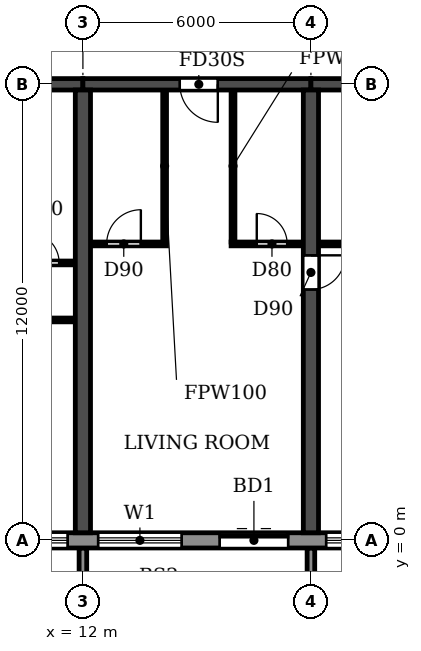
"""IFC4 building model, lengths in metres.
Left out: names, types, materials, properties, quantities, classifications, styles, units other than length and angle.
Written with IfcOpenShell. Run it as: python <this file> out.ifc"""

import sys

from ifc_helpers import new_model, si_unit, direction, frame, frame_2d, origin, place, context, subcontext, project, spatial, polyline, rectangle, outline, extrude, source, transform, mapped, element, fill, save


model = new_model("IFC4")
c1 = context("Model", 3, precision=1e-05, world=origin(), true_north=direction((0.0, 1.0)))
c2 = subcontext(c1, "Body", "Model", "MODEL_VIEW")
j1 = project(units=[si_unit("LENGTHUNIT", "METRE"), si_unit("PLANEANGLEUNIT", "RADIAN")], contexts=[c1])
p1 = place(None, origin())
s1 = spatial("IfcSite", under=j1, at=p1, CompositionType="ELEMENT")
p2 = place(p1, origin())
s2 = spatial("IfcBuilding", under=s1, at=p2, CompositionType="ELEMENT")
p3 = place(p2, frame((0.0, 0.0, 43.2)))
s3 = spatial("IfcBuildingStorey", under=s2, at=p3, CompositionType="ELEMENT", Elevation=43.2)
p4 = place(p3, frame((12.0, 0.2, 0.0), z_axis=(0.0, 0.0, 1.0), x_axis=(0.0, 1.0, 0.0)))
e1 = element("IfcWall", 1, at=p4, inside=s3, PredefinedType="SHEAR", context=c2, shape_type="SweptSolid", body=[
    extrude(rectangle(XDim=11.65, YDim=0.4, at=frame_2d((5.825, 0.0))), origin(), (0.0, 0.0, 1.0), 3.05),
])
p5 = place(p3, frame((18.0, 0.2, 0.0), z_axis=(0.0, 0.0, 1.0), x_axis=(0.0, 1.0, 0.0)))
e2 = element("IfcWall", 2, at=p5, inside=s3, PredefinedType="SHEAR", context=c2, shape_type="SweptSolid", body=[
    extrude(rectangle(XDim=11.65, YDim=0.4, at=frame_2d((5.825, 0.0))), origin(), (0.0, 0.0, 1.0), 3.05),
])
p6 = place(p5, frame((6.4, 0.0, 0.0)))
e3 = element("IfcOpeningElement", 3, at=p6, cuts=e2, PredefinedType="OPENING", context=c2, shape_type="SweptSolid", body=[
    extrude(rectangle(XDim=0.9, YDim=2.1, at=frame_2d((0.45, 1.05))), frame((0.0, 0.21, 0.0), z_axis=(0.0, -1.0, 0.0), x_axis=(1.0, 0.0, 0.0)), (0.0, 0.0, 1.0), 0.42),
])
p7 = place(p3, frame((6.0, 12.0, 0.0), z_axis=(0.0, 0.0, 1.0), x_axis=(1.0, 0.0, 0.0)))
e4 = element("IfcWall", 4, at=p7, inside=s3, PredefinedType="SHEAR", context=c2, shape_type="SweptSolid", body=[
    extrude(rectangle(XDim=6.0, YDim=0.3, at=frame_2d((3.0, 0.0))), origin(), (0.0, 0.0, 1.0), 2.45),
])
p8 = place(p7, frame((2.55, 0.0, 0.0)))
e5 = element("IfcOpeningElement", 5, at=p8, cuts=e4, PredefinedType="OPENING", context=c2, shape_type="SweptSolid", body=[
    extrude(rectangle(XDim=1.0, YDim=2.1, at=frame_2d((0.5, 1.05))), frame((0.0, 0.16, 0.0), z_axis=(0.0, -1.0, 0.0), x_axis=(1.0, 0.0, 0.0)), (0.0, 0.0, 1.0), 0.32),
])
p9 = place(p3, frame((12.0, 12.0, 0.0), z_axis=(0.0, 0.0, 1.0), x_axis=(1.0, 0.0, 0.0)))
e6 = element("IfcWall", 6, at=p9, inside=s3, PredefinedType="SHEAR", context=c2, shape_type="SweptSolid", body=[
    extrude(rectangle(XDim=6.0, YDim=0.3, at=frame_2d((3.0, 0.0))), origin(), (0.0, 0.0, 1.0), 2.45),
])
p10 = place(p9, frame((2.55, 0.0, 0.0)))
e7 = element("IfcOpeningElement", 7, at=p10, cuts=e6, PredefinedType="OPENING", context=c2, shape_type="SweptSolid", body=[
    extrude(rectangle(XDim=1.0, YDim=2.1, at=frame_2d((0.5, 1.05))), frame((0.0, 0.16, 0.0), z_axis=(0.0, -1.0, 0.0), x_axis=(1.0, 0.0, 0.0)), (0.0, 0.0, 1.0), 0.32),
])
p11 = place(p3, frame((18.0, 12.0, 0.0), z_axis=(0.0, 0.0, 1.0), x_axis=(1.0, 0.0, 0.0)))
e8 = element("IfcWall", 8, at=p11, inside=s3, PredefinedType="SHEAR", context=c2, shape_type="SweptSolid", body=[
    extrude(rectangle(XDim=6.0, YDim=0.3, at=frame_2d((3.0, 0.0))), origin(), (0.0, 0.0, 1.0), 2.45),
])
p12 = place(p3, frame((4.683, 0.0, 0.0), z_axis=(0.0, 0.0, 1.0), x_axis=(1.0, 0.0, 0.0)))
e9 = element("IfcWall", 9, at=p12, inside=s3, PredefinedType="STANDARD", context=c2, shape_type="SweptSolid", body=[
    extrude(rectangle(XDim=92.634, YDim=0.4, at=frame_2d((46.317, 0.0))), origin(), (0.0, 0.0, 1.0), 3.05),
])
p13 = place(p12, frame((1.717, 0.0, 0.9)))
e10 = element("IfcOpeningElement", 10, at=p13, cuts=e9, PredefinedType="OPENING", context=c2, shape_type="SweptSolid", body=[
    extrude(rectangle(XDim=2.2, YDim=1.5, at=frame_2d((1.1, 0.75))), frame((0.0, 0.21, 0.0), z_axis=(0.0, -1.0, 0.0), x_axis=(1.0, 0.0, 0.0)), (0.0, 0.0, 1.0), 0.42),
])
p14 = place(p12, frame((4.717, 0.0, 0.9)))
e11 = element("IfcOpeningElement", 11, at=p14, cuts=e9, PredefinedType="OPENING", context=c2, shape_type="SweptSolid", body=[
    extrude(rectangle(XDim=2.2, YDim=1.5, at=frame_2d((1.1, 0.75))), frame((0.0, 0.21, 0.0), z_axis=(0.0, -1.0, 0.0), x_axis=(1.0, 0.0, 0.0)), (0.0, 0.0, 1.0), 0.42),
])
p15 = place(p12, frame((7.717, 0.0, 0.9)))
e12 = element("IfcOpeningElement", 12, at=p15, cuts=e9, PredefinedType="OPENING", context=c2, shape_type="SweptSolid", body=[
    extrude(rectangle(XDim=2.2, YDim=1.5, at=frame_2d((1.1, 0.75))), frame((0.0, 0.21, 0.0), z_axis=(0.0, -1.0, 0.0), x_axis=(1.0, 0.0, 0.0)), (0.0, 0.0, 1.0), 0.42),
])
p16 = place(p12, frame((10.917, 0.0, 0.0)))
e13 = element("IfcOpeningElement", 13, at=p16, cuts=e9, PredefinedType="OPENING", context=c2, shape_type="SweptSolid", body=[
    extrude(rectangle(XDim=1.8, YDim=2.4, at=frame_2d((0.9, 1.2))), frame((0.0, 0.21, 0.0), z_axis=(0.0, -1.0, 0.0), x_axis=(1.0, 0.0, 0.0)), (0.0, 0.0, 1.0), 0.42),
])
p17 = place(p12, frame((13.717, 0.0, 0.9)))
e14 = element("IfcOpeningElement", 14, at=p17, cuts=e9, PredefinedType="OPENING", context=c2, shape_type="SweptSolid", body=[
    extrude(rectangle(XDim=2.2, YDim=1.5, at=frame_2d((1.1, 0.75))), frame((0.0, 0.21, 0.0), z_axis=(0.0, -1.0, 0.0), x_axis=(1.0, 0.0, 0.0)), (0.0, 0.0, 1.0), 0.42),
])
p18 = place(p12, frame((16.717, 0.0, 0.9)))
e15 = element("IfcOpeningElement", 15, at=p18, cuts=e9, PredefinedType="OPENING", context=c2, shape_type="SweptSolid", body=[
    extrude(rectangle(XDim=2.2, YDim=1.5, at=frame_2d((1.1, 0.75))), frame((0.0, 0.21, 0.0), z_axis=(0.0, -1.0, 0.0), x_axis=(1.0, 0.0, 0.0)), (0.0, 0.0, 1.0), 0.42),
])
p19 = place(p12, frame((19.917, 0.0, 0.0)))
e16 = element("IfcOpeningElement", 16, at=p19, cuts=e9, PredefinedType="OPENING", context=c2, shape_type="SweptSolid", body=[
    extrude(rectangle(XDim=1.8, YDim=2.4, at=frame_2d((0.9, 1.2))), frame((0.0, 0.21, 0.0), z_axis=(0.0, -1.0, 0.0), x_axis=(1.0, 0.0, 0.0)), (0.0, 0.0, 1.0), 0.42),
])
p20 = place(p12, frame((22.717, 0.0, 0.9)))
e17 = element("IfcOpeningElement", 17, at=p20, cuts=e9, PredefinedType="OPENING", context=c2, shape_type="SweptSolid", body=[
    extrude(rectangle(XDim=2.2, YDim=1.5, at=frame_2d((1.1, 0.75))), frame((0.0, 0.21, 0.0), z_axis=(0.0, -1.0, 0.0), x_axis=(1.0, 0.0, 0.0)), (0.0, 0.0, 1.0), 0.42),
])
p21 = place(p12, frame((25.717, 0.0, 0.9)))
e18 = element("IfcOpeningElement", 18, at=p21, cuts=e9, PredefinedType="OPENING", context=c2, shape_type="SweptSolid", body=[
    extrude(rectangle(XDim=2.2, YDim=1.5, at=frame_2d((1.1, 0.75))), frame((0.0, 0.21, 0.0), z_axis=(0.0, -1.0, 0.0), x_axis=(1.0, 0.0, 0.0)), (0.0, 0.0, 1.0), 0.42),
])
p22 = place(p12, frame((28.717, 0.0, 0.9)))
e19 = element("IfcOpeningElement", 19, at=p22, cuts=e9, PredefinedType="OPENING", context=c2, shape_type="SweptSolid", body=[
    extrude(rectangle(XDim=2.2, YDim=1.5, at=frame_2d((1.1, 0.75))), frame((0.0, 0.21, 0.0), z_axis=(0.0, -1.0, 0.0), x_axis=(1.0, 0.0, 0.0)), (0.0, 0.0, 1.0), 0.42),
])
p23 = place(p12, frame((31.717, 0.0, 0.9)))
e20 = element("IfcOpeningElement", 20, at=p23, cuts=e9, PredefinedType="OPENING", context=c2, shape_type="SweptSolid", body=[
    extrude(rectangle(XDim=2.2, YDim=1.5, at=frame_2d((1.1, 0.75))), frame((0.0, 0.21, 0.0), z_axis=(0.0, -1.0, 0.0), x_axis=(1.0, 0.0, 0.0)), (0.0, 0.0, 1.0), 0.42),
])
p24 = place(p12, frame((34.917, 0.0, 0.0)))
e21 = element("IfcOpeningElement", 21, at=p24, cuts=e9, PredefinedType="OPENING", context=c2, shape_type="SweptSolid", body=[
    extrude(rectangle(XDim=1.8, YDim=2.4, at=frame_2d((0.9, 1.2))), frame((0.0, 0.21, 0.0), z_axis=(0.0, -1.0, 0.0), x_axis=(1.0, 0.0, 0.0)), (0.0, 0.0, 1.0), 0.42),
])
p25 = place(p12, frame((37.717, 0.0, 0.9)))
e22 = element("IfcOpeningElement", 22, at=p25, cuts=e9, PredefinedType="OPENING", context=c2, shape_type="SweptSolid", body=[
    extrude(rectangle(XDim=2.2, YDim=1.5, at=frame_2d((1.1, 0.75))), frame((0.0, 0.21, 0.0), z_axis=(0.0, -1.0, 0.0), x_axis=(1.0, 0.0, 0.0)), (0.0, 0.0, 1.0), 0.42),
])
p26 = place(p12, frame((40.717, 0.0, 0.9)))
e23 = element("IfcOpeningElement", 23, at=p26, cuts=e9, PredefinedType="OPENING", context=c2, shape_type="SweptSolid", body=[
    extrude(rectangle(XDim=2.2, YDim=1.5, at=frame_2d((1.1, 0.75))), frame((0.0, 0.21, 0.0), z_axis=(0.0, -1.0, 0.0), x_axis=(1.0, 0.0, 0.0)), (0.0, 0.0, 1.0), 0.42),
])
p27 = place(p12, frame((43.717, 0.0, 0.9)))
e24 = element("IfcOpeningElement", 24, at=p27, cuts=e9, PredefinedType="OPENING", context=c2, shape_type="SweptSolid", body=[
    extrude(rectangle(XDim=2.2, YDim=1.5, at=frame_2d((1.1, 0.75))), frame((0.0, 0.21, 0.0), z_axis=(0.0, -1.0, 0.0), x_axis=(1.0, 0.0, 0.0)), (0.0, 0.0, 1.0), 0.42),
])
p28 = place(p12, frame((46.917, 0.0, 0.0)))
e25 = element("IfcOpeningElement", 25, at=p28, cuts=e9, PredefinedType="OPENING", context=c2, shape_type="SweptSolid", body=[
    extrude(rectangle(XDim=1.8, YDim=2.4, at=frame_2d((0.9, 1.2))), frame((0.0, 0.21, 0.0), z_axis=(0.0, -1.0, 0.0), x_axis=(1.0, 0.0, 0.0)), (0.0, 0.0, 1.0), 0.42),
])
p29 = place(p12, frame((49.717, 0.0, 0.9)))
e26 = element("IfcOpeningElement", 26, at=p29, cuts=e9, PredefinedType="OPENING", context=c2, shape_type="SweptSolid", body=[
    extrude(rectangle(XDim=2.2, YDim=1.5, at=frame_2d((1.1, 0.75))), frame((0.0, 0.21, 0.0), z_axis=(0.0, -1.0, 0.0), x_axis=(1.0, 0.0, 0.0)), (0.0, 0.0, 1.0), 0.42),
])
p30 = place(p12, frame((52.717, 0.0, 0.9)))
e27 = element("IfcOpeningElement", 27, at=p30, cuts=e9, PredefinedType="OPENING", context=c2, shape_type="SweptSolid", body=[
    extrude(rectangle(XDim=2.2, YDim=1.5, at=frame_2d((1.1, 0.75))), frame((0.0, 0.21, 0.0), z_axis=(0.0, -1.0, 0.0), x_axis=(1.0, 0.0, 0.0)), (0.0, 0.0, 1.0), 0.42),
])
p31 = place(p12, frame((55.717, 0.0, 0.9)))
e28 = element("IfcOpeningElement", 28, at=p31, cuts=e9, PredefinedType="OPENING", context=c2, shape_type="SweptSolid", body=[
    extrude(rectangle(XDim=2.2, YDim=1.5, at=frame_2d((1.1, 0.75))), frame((0.0, 0.21, 0.0), z_axis=(0.0, -1.0, 0.0), x_axis=(1.0, 0.0, 0.0)), (0.0, 0.0, 1.0), 0.42),
])
p32 = place(p12, frame((58.917, 0.0, 0.0)))
e29 = element("IfcOpeningElement", 29, at=p32, cuts=e9, PredefinedType="OPENING", context=c2, shape_type="SweptSolid", body=[
    extrude(rectangle(XDim=1.8, YDim=2.4, at=frame_2d((0.9, 1.2))), frame((0.0, 0.21, 0.0), z_axis=(0.0, -1.0, 0.0), x_axis=(1.0, 0.0, 0.0)), (0.0, 0.0, 1.0), 0.42),
])
p33 = place(p12, frame((61.717, 0.0, 0.9)))
e30 = element("IfcOpeningElement", 30, at=p33, cuts=e9, PredefinedType="OPENING", context=c2, shape_type="SweptSolid", body=[
    extrude(rectangle(XDim=2.2, YDim=1.5, at=frame_2d((1.1, 0.75))), frame((0.0, 0.21, 0.0), z_axis=(0.0, -1.0, 0.0), x_axis=(1.0, 0.0, 0.0)), (0.0, 0.0, 1.0), 0.42),
])
p34 = place(p12, frame((64.717, 0.0, 0.9)))
e31 = element("IfcOpeningElement", 31, at=p34, cuts=e9, PredefinedType="OPENING", context=c2, shape_type="SweptSolid", body=[
    extrude(rectangle(XDim=2.2, YDim=1.5, at=frame_2d((1.1, 0.75))), frame((0.0, 0.21, 0.0), z_axis=(0.0, -1.0, 0.0), x_axis=(1.0, 0.0, 0.0)), (0.0, 0.0, 1.0), 0.42),
])
p35 = place(p12, frame((67.717, 0.0, 0.9)))
e32 = element("IfcOpeningElement", 32, at=p35, cuts=e9, PredefinedType="OPENING", context=c2, shape_type="SweptSolid", body=[
    extrude(rectangle(XDim=2.2, YDim=1.5, at=frame_2d((1.1, 0.75))), frame((0.0, 0.21, 0.0), z_axis=(0.0, -1.0, 0.0), x_axis=(1.0, 0.0, 0.0)), (0.0, 0.0, 1.0), 0.42),
])
p36 = place(p12, frame((70.917, 0.0, 0.0)))
e33 = element("IfcOpeningElement", 33, at=p36, cuts=e9, PredefinedType="OPENING", context=c2, shape_type="SweptSolid", body=[
    extrude(rectangle(XDim=1.8, YDim=2.4, at=frame_2d((0.9, 1.2))), frame((0.0, 0.21, 0.0), z_axis=(0.0, -1.0, 0.0), x_axis=(1.0, 0.0, 0.0)), (0.0, 0.0, 1.0), 0.42),
])
p37 = place(p12, frame((73.717, 0.0, 0.9)))
e34 = element("IfcOpeningElement", 34, at=p37, cuts=e9, PredefinedType="OPENING", context=c2, shape_type="SweptSolid", body=[
    extrude(rectangle(XDim=2.2, YDim=1.5, at=frame_2d((1.1, 0.75))), frame((0.0, 0.21, 0.0), z_axis=(0.0, -1.0, 0.0), x_axis=(1.0, 0.0, 0.0)), (0.0, 0.0, 1.0), 0.42),
])
p38 = place(p12, frame((76.717, 0.0, 0.9)))
e35 = element("IfcOpeningElement", 35, at=p38, cuts=e9, PredefinedType="OPENING", context=c2, shape_type="SweptSolid", body=[
    extrude(rectangle(XDim=2.2, YDim=1.5, at=frame_2d((1.1, 0.75))), frame((0.0, 0.21, 0.0), z_axis=(0.0, -1.0, 0.0), x_axis=(1.0, 0.0, 0.0)), (0.0, 0.0, 1.0), 0.42),
])
p39 = place(p12, frame((79.717, 0.0, 0.9)))
e36 = element("IfcOpeningElement", 36, at=p39, cuts=e9, PredefinedType="OPENING", context=c2, shape_type="SweptSolid", body=[
    extrude(rectangle(XDim=2.2, YDim=1.5, at=frame_2d((1.1, 0.75))), frame((0.0, 0.21, 0.0), z_axis=(0.0, -1.0, 0.0), x_axis=(1.0, 0.0, 0.0)), (0.0, 0.0, 1.0), 0.42),
])
p40 = place(p12, frame((82.917, 0.0, 0.0)))
e37 = element("IfcOpeningElement", 37, at=p40, cuts=e9, PredefinedType="OPENING", context=c2, shape_type="SweptSolid", body=[
    extrude(rectangle(XDim=1.8, YDim=2.4, at=frame_2d((0.9, 1.2))), frame((0.0, 0.21, 0.0), z_axis=(0.0, -1.0, 0.0), x_axis=(1.0, 0.0, 0.0)), (0.0, 0.0, 1.0), 0.42),
])
p41 = place(p12, frame((85.717, 0.0, 0.9)))
e38 = element("IfcOpeningElement", 38, at=p41, cuts=e9, PredefinedType="OPENING", context=c2, shape_type="SweptSolid", body=[
    extrude(rectangle(XDim=2.2, YDim=1.5, at=frame_2d((1.1, 0.75))), frame((0.0, 0.21, 0.0), z_axis=(0.0, -1.0, 0.0), x_axis=(1.0, 0.0, 0.0)), (0.0, 0.0, 1.0), 0.42),
])
p42 = place(p12, frame((88.717, 0.0, 0.9)))
e39 = element("IfcOpeningElement", 39, at=p42, cuts=e9, PredefinedType="OPENING", context=c2, shape_type="SweptSolid", body=[
    extrude(rectangle(XDim=2.2, YDim=1.5, at=frame_2d((1.1, 0.75))), frame((0.0, 0.21, 0.0), z_axis=(0.0, -1.0, 0.0), x_axis=(1.0, 0.0, 0.0)), (0.0, 0.0, 1.0), 0.42),
])
m1 = source(origin(), c2, "Body", "SweptSolid", [
    extrude(outline(polyline([(0.0, 0.0), (0.2, 0.0), (0.2, 1.65), (0.0, 1.65), (0.0, 0.0)])), origin(), (0.0, 0.0, 1.0), 3.1),
])
for number, where in (
    (40, (11.9, -1.85, 0.0)),
    (41, (17.9, -1.85, 0.0)),
):
    element("IfcWall", number, at=place(p3, frame(where)), inside=s3, PredefinedType="STANDARD", context=c2, shape_type="MappedRepresentation", body=[
        mapped(m1, transform((0.0, 0.0, 0.0))),
    ])
p43 = place(p3, frame((8.95, 5.8, 0.0), z_axis=(0.0, 0.0, 1.0), x_axis=(1.0, 0.0, 0.0)))
e42 = element("IfcWall", 42, at=p43, inside=s3, PredefinedType="PARTITIONING", context=c2, shape_type="SweptSolid", body=[
    extrude(rectangle(XDim=2.84, YDim=0.1, at=frame_2d((1.42, 0.0))), origin(), (0.0, 0.0, 1.0), 3.05),
])
p44 = place(p43, frame((0.55, 0.0, 0.0)))
e43 = element("IfcOpeningElement", 43, at=p44, cuts=e42, PredefinedType="OPENING", context=c2, shape_type="SweptSolid", body=[
    extrude(rectangle(XDim=0.9, YDim=2.1, at=frame_2d((0.45, 1.05))), frame((0.0, 0.06, 0.0), z_axis=(0.0, -1.0, 0.0), x_axis=(1.0, 0.0, 0.0)), (0.0, 0.0, 1.0), 0.12),
])
p45 = place(p3, frame((9.9, 7.3, 0.0), z_axis=(0.0, 0.0, 1.0), x_axis=(1.0, 0.0, 0.0)))
e44 = element("IfcWall", 44, at=p45, inside=s3, PredefinedType="PARTITIONING", context=c2, shape_type="SweptSolid", body=[
    extrude(rectangle(XDim=1.89, YDim=0.1, at=frame_2d((0.945, 0.0))), origin(), (0.0, 0.0, 1.0), 3.05),
])
p46 = place(p45, frame((0.675, 0.0, 0.0)))
e45 = element("IfcOpeningElement", 45, at=p46, cuts=e44, PredefinedType="OPENING", context=c2, shape_type="SweptSolid", body=[
    extrude(rectangle(XDim=0.8, YDim=2.1, at=frame_2d((0.4, 1.05))), frame((0.0, 0.06, 0.0), z_axis=(0.0, -1.0, 0.0), x_axis=(1.0, 0.0, 0.0)), (0.0, 0.0, 1.0), 0.12),
])
p47 = place(p3, frame((12.21, 7.8, 0.0), z_axis=(0.0, 0.0, 1.0), x_axis=(1.0, 0.0, 0.0)))
e46 = element("IfcWall", 46, at=p47, inside=s3, PredefinedType="PARTITIONING", context=c2, shape_type="SweptSolid", body=[
    extrude(rectangle(XDim=1.99, YDim=0.1, at=frame_2d((0.995, 0.0))), origin(), (0.0, 0.0, 1.0), 3.05),
])
p48 = place(p47, frame((0.415, 0.0, 0.0)))
e47 = element("IfcOpeningElement", 47, at=p48, cuts=e46, PredefinedType="OPENING", context=c2, shape_type="SweptSolid", body=[
    extrude(rectangle(XDim=0.9, YDim=2.1, at=frame_2d((0.45, 1.05))), frame((0.0, 0.06, 0.0), z_axis=(0.0, -1.0, 0.0), x_axis=(1.0, 0.0, 0.0)), (0.0, 0.0, 1.0), 0.12),
])
p49 = place(p3, frame((15.9, 7.8, 0.0), z_axis=(0.0, 0.0, 1.0), x_axis=(1.0, 0.0, 0.0)))
e48 = element("IfcWall", 48, at=p49, inside=s3, PredefinedType="PARTITIONING", context=c2, shape_type="SweptSolid", body=[
    extrude(rectangle(XDim=1.89, YDim=0.1, at=frame_2d((0.945, 0.0))), origin(), (0.0, 0.0, 1.0), 3.05),
])
p50 = place(p49, frame((0.675, 0.0, 0.0)))
e49 = element("IfcOpeningElement", 49, at=p50, cuts=e48, PredefinedType="OPENING", context=c2, shape_type="SweptSolid", body=[
    extrude(rectangle(XDim=0.8, YDim=2.1, at=frame_2d((0.4, 1.05))), frame((0.0, 0.06, 0.0), z_axis=(0.0, -1.0, 0.0), x_axis=(1.0, 0.0, 0.0)), (0.0, 0.0, 1.0), 0.12),
])
p51 = place(p3, frame((18.21, 7.8, 0.0), z_axis=(0.0, 0.0, 1.0), x_axis=(1.0, 0.0, 0.0)))
e50 = element("IfcWall", 50, at=p51, inside=s3, PredefinedType="PARTITIONING", context=c2, shape_type="SweptSolid", body=[
    extrude(rectangle(XDim=2.69, YDim=0.1, at=frame_2d((1.345, 0.0))), origin(), (0.0, 0.0, 1.0), 3.05),
])
p52 = place(p51, frame((0.89, 0.0, 0.0)))
e51 = element("IfcOpeningElement", 51, at=p52, cuts=e50, PredefinedType="OPENING", context=c2, shape_type="SweptSolid", body=[
    extrude(rectangle(XDim=0.8, YDim=2.1, at=frame_2d((0.4, 1.05))), frame((0.0, 0.06, 0.0), z_axis=(0.0, -1.0, 0.0), x_axis=(1.0, 0.0, 0.0)), (0.0, 0.0, 1.0), 0.12),
])
for number, where, z_axis, x_axis in (
    (52, (14.15, 7.85, 0.0), (0.0, 0.0, 1.0), (0.0, 1.0, 0.0)),
    (53, (15.95, 7.85, 0.0), (0.0, 0.0, 1.0), (0.0, 1.0, 0.0)),
):
    element("IfcWall", number, at=place(p3, frame(where, z_axis=z_axis, x_axis=x_axis)), inside=s3, PredefinedType="PARTITIONING", context=c2, shape_type="SweptSolid", body=[
        extrude(rectangle(XDim=3.99, YDim=0.1, at=frame_2d((1.995, 0.0))), origin(), (0.0, 0.0, 1.0), 3.05),
    ])
p53 = place(p14, origin())
e54 = element("IfcWindow", 54, at=p53, inside=s3, PartitioningType="DOUBLE_PANEL_HORIZONTAL", PredefinedType="WINDOW", context=c2, shape_type="SweptSolid", body=[
    extrude(rectangle(XDim=2.2, YDim=1.5, at=frame_2d((1.1, 0.75))), frame((0.0, 0.03, 0.0), z_axis=(0.0, -1.0, 0.0), x_axis=(1.0, 0.0, 0.0)), (0.0, 0.0, 1.0), 0.06),
])
fill(e11, e54)
p54 = place(p15, origin())
e55 = element("IfcWindow", 55, at=p54, inside=s3, PartitioningType="DOUBLE_PANEL_HORIZONTAL", PredefinedType="WINDOW", context=c2, shape_type="SweptSolid", body=[
    extrude(rectangle(XDim=2.2, YDim=1.5, at=frame_2d((1.1, 0.75))), frame((0.0, 0.03, 0.0), z_axis=(0.0, -1.0, 0.0), x_axis=(1.0, 0.0, 0.0)), (0.0, 0.0, 1.0), 0.06),
])
fill(e12, e55)
p55 = place(p16, origin())
e56 = element("IfcDoor", 56, at=p55, inside=s3, OperationType="DOUBLE_DOOR_SLIDING", PredefinedType="DOOR", context=c2, shape_type="SweptSolid", body=[
    extrude(rectangle(XDim=1.8, YDim=2.4, at=frame_2d((0.9, 1.2))), frame((0.0, 0.025, 0.0), z_axis=(0.0, -1.0, 0.0), x_axis=(1.0, 0.0, 0.0)), (0.0, 0.0, 1.0), 0.05),
])
fill(e13, e56)
p56 = place(p17, origin())
e57 = element("IfcWindow", 57, at=p56, inside=s3, PartitioningType="DOUBLE_PANEL_HORIZONTAL", PredefinedType="WINDOW", context=c2, shape_type="SweptSolid", body=[
    extrude(rectangle(XDim=2.2, YDim=1.5, at=frame_2d((1.1, 0.75))), frame((0.0, 0.03, 0.0), z_axis=(0.0, -1.0, 0.0), x_axis=(1.0, 0.0, 0.0)), (0.0, 0.0, 1.0), 0.06),
])
fill(e14, e57)
p57 = place(p46, origin())
e58 = element("IfcDoor", 58, at=p57, inside=s3, OperationType="SINGLE_SWING_LEFT", PredefinedType="DOOR", context=c2, shape_type="SweptSolid", body=[
    extrude(rectangle(XDim=0.8, YDim=2.1, at=frame_2d((0.4, 1.05))), frame((0.0, 0.025, 0.0), z_axis=(0.0, -1.0, 0.0), x_axis=(1.0, 0.0, 0.0)), (0.0, 0.0, 1.0), 0.05),
])
fill(e45, e58)
p58 = place(p48, origin())
e59 = element("IfcDoor", 59, at=p58, inside=s3, OperationType="SINGLE_SWING_RIGHT", PredefinedType="DOOR", context=c2, shape_type="SweptSolid", body=[
    extrude(rectangle(XDim=0.9, YDim=2.1, at=frame_2d((0.45, 1.05))), frame((0.0, 0.025, 0.0), z_axis=(0.0, -1.0, 0.0), x_axis=(1.0, 0.0, 0.0)), (0.0, 0.0, 1.0), 0.05),
])
fill(e47, e59)
p59 = place(p10, frame((1.0, 0.0, 0.0), z_axis=(0.0, 0.0, 1.0), x_axis=(-1.0, 0.0, 0.0)))
e60 = element("IfcDoor", 60, at=p59, inside=s3, OperationType="SINGLE_SWING_LEFT", PredefinedType="DOOR", context=c2, shape_type="SweptSolid", body=[
    extrude(rectangle(XDim=1.0, YDim=2.1, at=frame_2d((0.5, 1.05))), frame((0.0, 0.025, 0.0), z_axis=(0.0, -1.0, 0.0), x_axis=(1.0, 0.0, 0.0)), (0.0, 0.0, 1.0), 0.05),
])
fill(e7, e60)
p60 = place(p50, origin())
e61 = element("IfcDoor", 61, at=p60, inside=s3, OperationType="SINGLE_SWING_LEFT", PredefinedType="DOOR", context=c2, shape_type="SweptSolid", body=[
    extrude(rectangle(XDim=0.8, YDim=2.1, at=frame_2d((0.4, 1.05))), frame((0.0, 0.025, 0.0), z_axis=(0.0, -1.0, 0.0), x_axis=(1.0, 0.0, 0.0)), (0.0, 0.0, 1.0), 0.05),
])
fill(e49, e61)
p61 = place(p6, frame((0.9, 0.0, 0.0), z_axis=(0.0, 0.0, 1.0), x_axis=(-1.0, 0.0, 0.0)))
e62 = element("IfcDoor", 62, at=p61, inside=s3, OperationType="SINGLE_SWING_LEFT", PredefinedType="DOOR", context=c2, shape_type="SweptSolid", body=[
    extrude(rectangle(XDim=0.9, YDim=2.1, at=frame_2d((0.45, 1.05))), frame((0.0, 0.025, 0.0), z_axis=(0.0, -1.0, 0.0), x_axis=(1.0, 0.0, 0.0)), (0.0, 0.0, 1.0), 0.05),
])
fill(e3, e62)
save(model, sys.argv[1])
